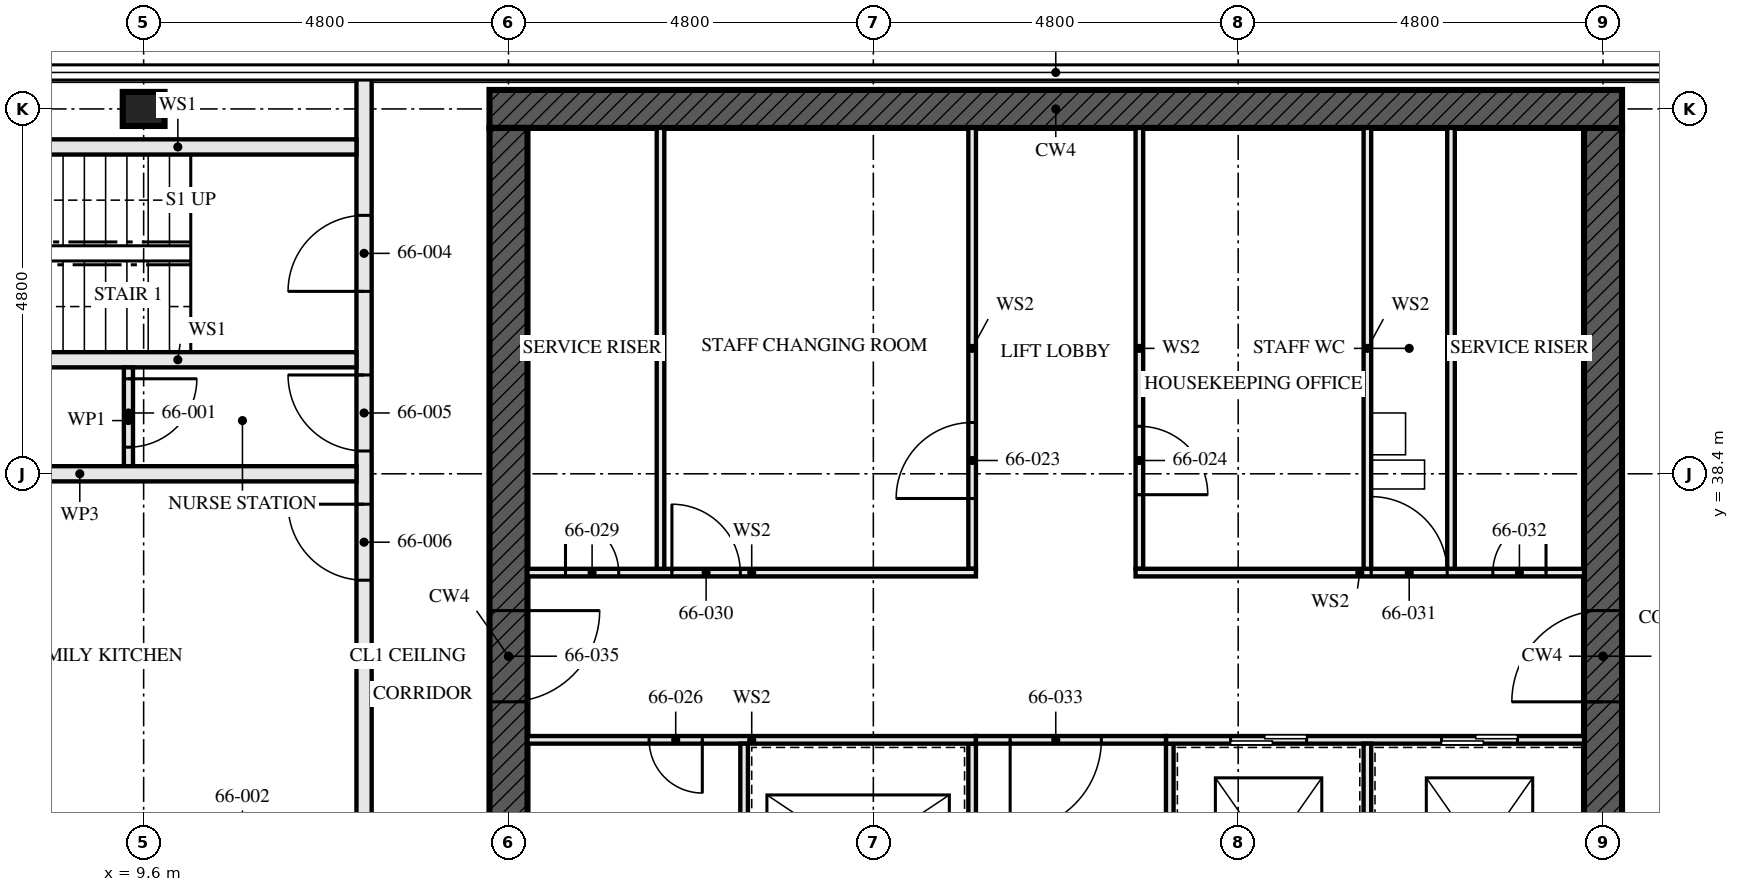
"""IFC4 building model, lengths in metres.
Left out: names, types, materials, properties, quantities, classifications, styles, units other than length and angle.
Written with IfcOpenShell. Run it as: python <this file> out.ifc"""

import sys

from ifc_helpers import new_model, si_unit, direction, frame, frame_2d, origin, origin_2d, place, context, subcontext, project, spatial, rectangle, i_section, extrude, element, fill, save


model = new_model("IFC4")
c1 = context("Model", 3, precision=1e-05, world=origin(), true_north=direction((0.0, 1.0)))
c2 = subcontext(c1, "Body", "Model", "MODEL_VIEW")
j1 = project(units=[si_unit("LENGTHUNIT", "METRE"), si_unit("PLANEANGLEUNIT", "RADIAN")], contexts=[c1])
p1 = place(None, origin())
s1 = spatial("IfcSite", under=j1, at=p1, CompositionType="ELEMENT")
p2 = place(p1, origin())
s2 = spatial("IfcBuilding", under=s1, at=p2, CompositionType="ELEMENT")
p3 = place(p2, frame((0.0, 0.0, 240.0)))
s3 = spatial("IfcBuildingStorey", under=s2, at=p3, CompositionType="ELEMENT", Elevation=240.0)
p4 = place(p3, frame((9.6, 43.2, 0.0), z_axis=(0.0, 0.0, 1.0), x_axis=(0.0, 1.0, 0.0)))
e1 = element("IfcColumn", 1, at=p4, inside=s3, PredefinedType="COLUMN", context=c2, shape_type="SweptSolid", body=[
    extrude(i_section(OverallWidth=0.448, OverallDepth=0.55, WebThickness=0.072, FlangeThickness=0.115, FilletRadius=0.015, at=origin_2d()), origin(), (0.0, 0.0, 1.0), 3.5),
])
p5 = place(p3, frame((29.05, 43.2, -0.17), z_axis=(0.0, 0.0, 1.0), x_axis=(-1.0, 0.0, 0.0)))
e2 = element("IfcWall", 2, at=p5, inside=s3, PredefinedType="SHEAR", context=c2, shape_type="SweptSolid", body=[
    extrude(rectangle(XDim=14.9, YDim=0.5, at=frame_2d((7.45, 0.0))), origin(), (0.0, 0.0, 1.0), 3.42),
])
p6 = place(p3, frame((14.4, 42.95, -0.17), z_axis=(0.0, 0.0, 1.0), x_axis=(0.0, -1.0, 0.0)))
e3 = element("IfcWall", 3, at=p6, inside=s3, PredefinedType="SHEAR", context=c2, shape_type="SweptSolid", body=[
    extrude(rectangle(XDim=13.9, YDim=0.5, at=frame_2d((6.95, 0.0))), origin(), (0.0, 0.0, 1.0), 3.42),
])
p7 = place(p6, frame((6.35, 0.0, 0.17)))
e4 = element("IfcOpeningElement", 4, at=p7, cuts=e3, PredefinedType="OPENING", context=c2, shape_type="SweptSolid", body=[
    extrude(rectangle(XDim=1.2, YDim=2.1, at=frame_2d((0.6, 1.05))), frame((0.0, 0.26, 0.0), z_axis=(0.0, -1.0, 0.0), x_axis=(1.0, 0.0, 0.0)), (0.0, 0.0, 1.0), 0.521),
])
p8 = place(p3, frame((28.8, 29.05, -0.17), z_axis=(0.0, 0.0, 1.0), x_axis=(0.0, 1.0, 0.0)))
e5 = element("IfcWall", 5, at=p8, inside=s3, PredefinedType="SHEAR", context=c2, shape_type="SweptSolid", body=[
    extrude(rectangle(XDim=13.9, YDim=0.5, at=frame_2d((6.95, 0.0))), origin(), (0.0, 0.0, 1.0), 3.42),
])
p9 = place(p8, frame((6.35, 0.0, 0.17)))
e6 = element("IfcOpeningElement", 6, at=p9, cuts=e5, PredefinedType="OPENING", context=c2, shape_type="SweptSolid", body=[
    extrude(rectangle(XDim=1.2, YDim=2.1, at=frame_2d((0.6, 1.05))), frame((0.0, 0.26, 0.0), z_axis=(0.0, -1.0, 0.0), x_axis=(1.0, 0.0, 0.0)), (0.0, 0.0, 1.0), 0.521),
])
for number, where, z_axis, x_axis in (
    (7, (7.7, 42.7, 0.0), (0.0, 0.0, 1.0), (1.0, 0.0, 0.0)),
    (8, (7.7, 39.9, 0.0), (0.0, 0.0, 1.0), (1.0, 0.0, 0.0)),
):
    element("IfcWall", number, at=place(p3, frame(where, z_axis=z_axis, x_axis=x_axis)), inside=s3, PredefinedType="SOLIDWALL", context=c2, shape_type="SweptSolid", body=[
        extrude(rectangle(XDim=4.7, YDim=0.2, at=frame_2d((2.35, 0.0))), origin(), (0.0, 0.0, 1.0), 2.94),
    ])
p10 = place(p3, frame((9.4, 39.8, 0.0), z_axis=(0.0, 0.0, 1.0), x_axis=(0.0, -1.0, 0.0)))
e9 = element("IfcWall", 9, at=p10, inside=s3, PredefinedType="PARTITIONING", context=c2, shape_type="SweptSolid", body=[
    extrude(rectangle(XDim=1.4, YDim=0.12, at=frame_2d((0.7, 0.0))), origin(), (0.0, 0.0, 1.0), 3.25),
])
p11 = place(p10, frame((0.15, 0.0, 0.0)))
e10 = element("IfcOpeningElement", 10, at=p11, cuts=e9, PredefinedType="OPENING", context=c2, shape_type="SweptSolid", body=[
    extrude(rectangle(XDim=0.9, YDim=2.1, at=frame_2d((0.45, 1.05))), frame((0.0, 0.071, 0.0), z_axis=(0.0, -1.0, 0.0), x_axis=(1.0, 0.0, 0.0)), (0.0, 0.0, 1.0), 0.141),
])
p12 = place(p3, frame((5.12, 38.4, 0.0), z_axis=(0.0, 0.0, 1.0), x_axis=(1.0, 0.0, 0.0)))
e11 = element("IfcWall", 11, at=p12, inside=s3, PredefinedType="PARTITIONING", context=c2, shape_type="SweptSolid", body=[
    extrude(rectangle(XDim=7.28, YDim=0.2, at=frame_2d((3.64, 0.0))), origin(), (0.0, 0.0, 1.0), 2.24),
])
p13 = place(p3, frame((12.5, 43.655, 0.0), z_axis=(0.0, 0.0, 1.0), x_axis=(0.0, -1.0, 0.0)))
e12 = element("IfcWall", 12, at=p13, inside=s3, PredefinedType="PARTITIONING", context=c2, shape_type="SweptSolid", body=[
    extrude(rectangle(XDim=15.31, YDim=0.2, at=frame_2d((7.655, 0.0))), origin(), (0.0, 0.0, 1.0), 2.24),
])
p14 = place(p13, frame((1.855, 0.0, 0.0)))
e13 = element("IfcOpeningElement", 13, at=p14, cuts=e12, PredefinedType="OPENING", context=c2, shape_type="SweptSolid", body=[
    extrude(rectangle(XDim=1.0, YDim=2.1, at=frame_2d((0.5, 1.05))), frame((0.0, 0.111, 0.0), z_axis=(0.0, -1.0, 0.0), x_axis=(1.0, 0.0, 0.0)), (0.0, 0.0, 1.0), 0.221),
])
p15 = place(p13, frame((3.955, 0.0, 0.0)))
e14 = element("IfcOpeningElement", 14, at=p15, cuts=e12, PredefinedType="OPENING", context=c2, shape_type="SweptSolid", body=[
    extrude(rectangle(XDim=1.0, YDim=2.1, at=frame_2d((0.5, 1.05))), frame((0.0, 0.111, 0.0), z_axis=(0.0, -1.0, 0.0), x_axis=(1.0, 0.0, 0.0)), (0.0, 0.0, 1.0), 0.221),
])
p16 = place(p13, frame((5.655, 0.0, 0.0)))
e15 = element("IfcOpeningElement", 15, at=p16, cuts=e12, PredefinedType="OPENING", context=c2, shape_type="SweptSolid", body=[
    extrude(rectangle(XDim=1.0, YDim=2.1, at=frame_2d((0.5, 1.05))), frame((0.0, 0.111, 0.0), z_axis=(0.0, -1.0, 0.0), x_axis=(1.0, 0.0, 0.0)), (0.0, 0.0, 1.0), 0.221),
])
for number, where, z_axis, x_axis in (
    (16, (16.4, 37.15, 0.0), (0.0, 0.0, 1.0), (0.0, 1.0, 0.0)),
    (17, (26.8, 37.15, 0.0), (0.0, 0.0, 1.0), (0.0, 1.0, 0.0)),
):
    element("IfcWall", number, at=place(p3, frame(where, z_axis=z_axis, x_axis=x_axis)), inside=s3, PredefinedType="SOLIDWALL", context=c2, shape_type="SweptSolid", body=[
        extrude(rectangle(XDim=5.8, YDim=0.1, at=frame_2d((2.9, 0.0))), origin(), (0.0, 0.0, 1.0), 3.25),
    ])
p17 = place(p3, frame((20.5, 29.05, 0.0), z_axis=(0.0, 0.0, 1.0), x_axis=(0.0, 1.0, 0.0)))
e18 = element("IfcWall", 18, at=p17, inside=s3, PredefinedType="SOLIDWALL", context=c2, shape_type="SweptSolid", body=[
    extrude(rectangle(XDim=5.8, YDim=0.1, at=frame_2d((2.9, 0.0))), origin(), (0.0, 0.0, 1.0), 3.25),
])
p18 = place(p17, frame((0.8, 0.0, 0.0)))
e19 = element("IfcOpeningElement", 19, at=p18, cuts=e18, PredefinedType="OPENING", context=c2, shape_type="SweptSolid", body=[
    extrude(rectangle(XDim=1.1, YDim=2.3, at=frame_2d((0.55, 1.15))), frame((0.0, 0.061, 0.0), z_axis=(0.0, -1.0, 0.0), x_axis=(1.0, 0.0, 0.0)), (0.0, 0.0, 1.0), 0.121),
])
p19 = place(p17, frame((3.775, 0.0, 0.0)))
e20 = element("IfcOpeningElement", 20, at=p19, cuts=e18, PredefinedType="OPENING", context=c2, shape_type="SweptSolid", body=[
    extrude(rectangle(XDim=1.1, YDim=2.3, at=frame_2d((0.55, 1.15))), frame((0.0, 0.061, 0.0), z_axis=(0.0, -1.0, 0.0), x_axis=(1.0, 0.0, 0.0)), (0.0, 0.0, 1.0), 0.121),
])
p20 = place(p3, frame((20.5, 37.15, 0.0), z_axis=(0.0, 0.0, 1.0), x_axis=(0.0, 1.0, 0.0)))
e21 = element("IfcWall", 21, at=p20, inside=s3, PredefinedType="SOLIDWALL", context=c2, shape_type="SweptSolid", body=[
    extrude(rectangle(XDim=5.8, YDim=0.1, at=frame_2d((2.9, 0.0))), origin(), (0.0, 0.0, 1.0), 3.25),
])
p21 = place(p20, frame((0.925, 0.0, 0.0)))
e22 = element("IfcOpeningElement", 22, at=p21, cuts=e21, PredefinedType="OPENING", context=c2, shape_type="SweptSolid", body=[
    extrude(rectangle(XDim=1.0, YDim=2.1, at=frame_2d((0.5, 1.05))), frame((0.0, 0.061, 0.0), z_axis=(0.0, -1.0, 0.0), x_axis=(1.0, 0.0, 0.0)), (0.0, 0.0, 1.0), 0.121),
])
p22 = place(p3, frame((22.7, 37.15, 0.0), z_axis=(0.0, 0.0, 1.0), x_axis=(0.0, 1.0, 0.0)))
e23 = element("IfcWall", 23, at=p22, inside=s3, PredefinedType="SOLIDWALL", context=c2, shape_type="SweptSolid", body=[
    extrude(rectangle(XDim=5.8, YDim=0.1, at=frame_2d((2.9, 0.0))), origin(), (0.0, 0.0, 1.0), 3.25),
])
p23 = place(p22, frame((0.975, 0.0, 0.0)))
e24 = element("IfcOpeningElement", 24, at=p23, cuts=e23, PredefinedType="OPENING", context=c2, shape_type="SweptSolid", body=[
    extrude(rectangle(XDim=0.9, YDim=2.1, at=frame_2d((0.45, 1.05))), frame((0.0, 0.061, 0.0), z_axis=(0.0, -1.0, 0.0), x_axis=(1.0, 0.0, 0.0)), (0.0, 0.0, 1.0), 0.121),
])
p24 = place(p3, frame((23.1, 29.05, 0.0), z_axis=(0.0, 0.0, 1.0), x_axis=(0.0, 1.0, 0.0)))
e25 = element("IfcWall", 25, at=p24, inside=s3, PredefinedType="SOLIDWALL", context=c2, shape_type="SweptSolid", body=[
    extrude(rectangle(XDim=5.8, YDim=0.1, at=frame_2d((2.9, 0.0))), origin(), (0.0, 0.0, 1.0), 3.25),
])
p25 = place(p24, frame((1.0, 0.0, 0.0)))
e26 = element("IfcOpeningElement", 26, at=p25, cuts=e25, PredefinedType="OPENING", context=c2, shape_type="SweptSolid", body=[
    extrude(rectangle(XDim=0.7, YDim=2.1, at=frame_2d((0.35, 1.05))), frame((0.0, 0.061, 0.0), z_axis=(0.0, -1.0, 0.0), x_axis=(1.0, 0.0, 0.0)), (0.0, 0.0, 1.0), 0.121),
])
p26 = place(p3, frame((14.65, 34.9, 0.0), z_axis=(0.0, 0.0, 1.0), x_axis=(1.0, 0.0, 0.0)))
e27 = element("IfcWall", 27, at=p26, inside=s3, PredefinedType="SOLIDWALL", context=c2, shape_type="SweptSolid", body=[
    extrude(rectangle(XDim=5.9, YDim=0.1, at=frame_2d((2.95, 0.0))), origin(), (0.0, 0.0, 1.0), 3.25),
])
p27 = place(p26, frame((1.6, 0.0, 0.0)))
e28 = element("IfcOpeningElement", 28, at=p27, cuts=e27, PredefinedType="OPENING", context=c2, shape_type="SweptSolid", body=[
    extrude(rectangle(XDim=0.7, YDim=2.1, at=frame_2d((0.35, 1.05))), frame((0.0, 0.061, 0.0), z_axis=(0.0, -1.0, 0.0), x_axis=(1.0, 0.0, 0.0)), (0.0, 0.0, 1.0), 0.121),
])
p28 = place(p3, frame((23.05, 34.9, 0.0), z_axis=(0.0, 0.0, 1.0), x_axis=(1.0, 0.0, 0.0)))
e29 = element("IfcWall", 29, at=p28, inside=s3, PredefinedType="SOLIDWALL", context=c2, shape_type="SweptSolid", body=[
    extrude(rectangle(XDim=5.5, YDim=0.1, at=frame_2d((2.75, 0.0))), origin(), (0.0, 0.0, 1.0), 3.25),
])
p29 = place(p28, frame((0.85, 0.0, 0.0)))
e30 = element("IfcOpeningElement", 30, at=p29, cuts=e29, PredefinedType="OPENING", context=c2, shape_type="SweptSolid", body=[
    extrude(rectangle(XDim=1.0, YDim=2.1, at=frame_2d((0.5, 1.05))), frame((0.0, 0.061, 0.0), z_axis=(0.0, -1.0, 0.0), x_axis=(1.0, 0.0, 0.0)), (0.0, 0.0, 1.0), 0.121),
])
p30 = place(p28, frame((3.625, 0.0, 0.0)))
e31 = element("IfcOpeningElement", 31, at=p30, cuts=e29, PredefinedType="OPENING", context=c2, shape_type="SweptSolid", body=[
    extrude(rectangle(XDim=1.0, YDim=2.1, at=frame_2d((0.5, 1.05))), frame((0.0, 0.061, 0.0), z_axis=(0.0, -1.0, 0.0), x_axis=(1.0, 0.0, 0.0)), (0.0, 0.0, 1.0), 0.121),
])
p31 = place(p3, frame((14.65, 37.1, 0.0), z_axis=(0.0, 0.0, 1.0), x_axis=(1.0, 0.0, 0.0)))
e32 = element("IfcWall", 32, at=p31, inside=s3, PredefinedType="SOLIDWALL", context=c2, shape_type="SweptSolid", body=[
    extrude(rectangle(XDim=5.9, YDim=0.1, at=frame_2d((2.95, 0.0))), origin(), (0.0, 0.0, 1.0), 3.25),
])
p32 = place(p31, frame((0.5, 0.0, 0.0)))
e33 = element("IfcOpeningElement", 33, at=p32, cuts=e32, PredefinedType="OPENING", context=c2, shape_type="SweptSolid", body=[
    extrude(rectangle(XDim=0.7, YDim=2.1, at=frame_2d((0.35, 1.05))), frame((0.0, 0.061, 0.0), z_axis=(0.0, -1.0, 0.0), x_axis=(1.0, 0.0, 0.0)), (0.0, 0.0, 1.0), 0.121),
])
p33 = place(p31, frame((1.9, 0.0, 0.0)))
e34 = element("IfcOpeningElement", 34, at=p33, cuts=e32, PredefinedType="OPENING", context=c2, shape_type="SweptSolid", body=[
    extrude(rectangle(XDim=0.9, YDim=2.1, at=frame_2d((0.45, 1.05))), frame((0.0, 0.061, 0.0), z_axis=(0.0, -1.0, 0.0), x_axis=(1.0, 0.0, 0.0)), (0.0, 0.0, 1.0), 0.121),
])
p34 = place(p3, frame((22.65, 37.1, 0.0), z_axis=(0.0, 0.0, 1.0), x_axis=(1.0, 0.0, 0.0)))
e35 = element("IfcWall", 35, at=p34, inside=s3, PredefinedType="SOLIDWALL", context=c2, shape_type="SweptSolid", body=[
    extrude(rectangle(XDim=5.9, YDim=0.1, at=frame_2d((2.95, 0.0))), origin(), (0.0, 0.0, 1.0), 3.25),
])
p35 = place(p34, frame((3.1, 0.0, 0.0)))
e36 = element("IfcOpeningElement", 36, at=p35, cuts=e35, PredefinedType="OPENING", context=c2, shape_type="SweptSolid", body=[
    extrude(rectangle(XDim=1.0, YDim=2.1, at=frame_2d((0.5, 1.05))), frame((0.0, 0.061, 0.0), z_axis=(0.0, -1.0, 0.0), x_axis=(1.0, 0.0, 0.0)), (0.0, 0.0, 1.0), 0.121),
])
p36 = place(p34, frame((4.7, 0.0, 0.0)))
e37 = element("IfcOpeningElement", 37, at=p36, cuts=e35, PredefinedType="OPENING", context=c2, shape_type="SweptSolid", body=[
    extrude(rectangle(XDim=0.7, YDim=2.1, at=frame_2d((0.35, 1.05))), frame((0.0, 0.061, 0.0), z_axis=(0.0, -1.0, 0.0), x_axis=(1.0, 0.0, 0.0)), (0.0, 0.0, 1.0), 0.121),
])
p37 = place(p3, frame((20.55, 34.9, 0.0), z_axis=(0.0, 0.0, 1.0), x_axis=(1.0, 0.0, 0.0)))
e38 = element("IfcWall", 38, at=p37, inside=s3, PredefinedType="SOLIDWALL", context=c2, shape_type="SweptSolid", body=[
    extrude(rectangle(XDim=2.5, YDim=0.1, at=frame_2d((1.25, 0.0))), origin(), (0.0, 0.0, 1.0), 3.25),
])
p38 = place(p37, frame((0.45, 0.0, 0.0)))
e39 = element("IfcOpeningElement", 39, at=p38, cuts=e38, PredefinedType="OPENING", context=c2, shape_type="SweptSolid", body=[
    extrude(rectangle(XDim=1.2, YDim=2.1, at=frame_2d((0.6, 1.05))), frame((0.0, 0.061, 0.0), z_axis=(0.0, -1.0, 0.0), x_axis=(1.0, 0.0, 0.0)), (0.0, 0.0, 1.0), 0.121),
])
for number, where, z_axis, x_axis in (
    (40, (17.5, 29.05, 0.0), (0.0, 0.0, 1.0), (0.0, 1.0, 0.0)),
    (41, (25.7, 37.15, 0.0), (0.0, 0.0, 1.0), (0.0, 1.0, 0.0)),
):
    element("IfcWall", number, at=place(p3, frame(where, z_axis=z_axis, x_axis=x_axis)), inside=s3, PredefinedType="SOLIDWALL", context=c2, shape_type="SweptSolid", body=[
        extrude(rectangle(XDim=5.8, YDim=0.1, at=frame_2d((2.9, 0.0))), origin(), (0.0, 0.0, 1.0), 3.25),
    ])
p39 = place(p3, frame((25.7, 31.95, 0.0), z_axis=(0.0, 0.0, 1.0), x_axis=(0.0, 1.0, 0.0)))
e42 = element("IfcWall", 42, at=p39, inside=s3, PredefinedType="SOLIDWALL", context=c2, shape_type="SweptSolid", body=[
    extrude(rectangle(XDim=2.9, YDim=0.1, at=frame_2d((1.45, 0.0))), origin(), (0.0, 0.0, 1.0), 3.25),
])
p40 = place(p11, origin())
e43 = element("IfcDoor", 43, at=p40, inside=s3, OperationType="SINGLE_SWING_RIGHT", PredefinedType="DOOR", context=c2, shape_type="SweptSolid", body=[
    extrude(rectangle(XDim=0.9, YDim=2.1, at=frame_2d((0.45, 1.05))), frame((0.0, 0.022, 0.0), z_axis=(0.0, -1.0, 0.0), x_axis=(1.0, 0.0, 0.0)), (0.0, 0.0, 1.0), 0.044),
])
fill(e10, e43)
p41 = place(p14, frame((1.0, 0.0, 0.0), z_axis=(0.0, 0.0, 1.0), x_axis=(-1.0, 0.0, 0.0)))
e44 = element("IfcDoor", 44, at=p41, inside=s3, OperationType="SINGLE_SWING_RIGHT", PredefinedType="DOOR", context=c2, shape_type="SweptSolid", body=[
    extrude(rectangle(XDim=1.0, YDim=2.1, at=frame_2d((0.5, 1.05))), frame((0.0, 0.032, 0.0), z_axis=(0.0, -1.0, 0.0), x_axis=(1.0, 0.0, 0.0)), (0.0, 0.0, 1.0), 0.064),
])
fill(e13, e44)
p42 = place(p15, frame((1.0, 0.0, 0.0), z_axis=(0.0, 0.0, 1.0), x_axis=(-1.0, 0.0, 0.0)))
e45 = element("IfcDoor", 45, at=p42, inside=s3, OperationType="SINGLE_SWING_LEFT", PredefinedType="DOOR", context=c2, shape_type="SweptSolid", body=[
    extrude(rectangle(XDim=1.0, YDim=2.1, at=frame_2d((0.5, 1.05))), frame((0.0, 0.027, 0.0), z_axis=(0.0, -1.0, 0.0), x_axis=(1.0, 0.0, 0.0)), (0.0, 0.0, 1.0), 0.054),
])
fill(e14, e45)
p43 = place(p16, frame((1.0, 0.0, 0.0), z_axis=(0.0, 0.0, 1.0), x_axis=(-1.0, 0.0, 0.0)))
e46 = element("IfcDoor", 46, at=p43, inside=s3, OperationType="SINGLE_SWING_LEFT", PredefinedType="DOOR", context=c2, shape_type="SweptSolid", body=[
    extrude(rectangle(XDim=1.0, YDim=2.1, at=frame_2d((0.5, 1.05))), frame((0.0, 0.027, 0.0), z_axis=(0.0, -1.0, 0.0), x_axis=(1.0, 0.0, 0.0)), (0.0, 0.0, 1.0), 0.054),
])
fill(e15, e46)
p44 = place(p21, origin())
e47 = element("IfcDoor", 47, at=p44, inside=s3, OperationType="SINGLE_SWING_RIGHT", PredefinedType="DOOR", context=c2, shape_type="SweptSolid", body=[
    extrude(rectangle(XDim=1.0, YDim=2.1, at=frame_2d((0.5, 1.05))), frame((0.0, 0.027, 0.0), z_axis=(0.0, -1.0, 0.0), x_axis=(1.0, 0.0, 0.0)), (0.0, 0.0, 1.0), 0.054),
])
fill(e22, e47)
p45 = place(p23, frame((0.9, 0.0, 0.0), z_axis=(0.0, 0.0, 1.0), x_axis=(-1.0, 0.0, 0.0)))
e48 = element("IfcDoor", 48, at=p45, inside=s3, OperationType="SINGLE_SWING_LEFT", PredefinedType="DOOR", context=c2, shape_type="SweptSolid", body=[
    extrude(rectangle(XDim=0.9, YDim=2.1, at=frame_2d((0.45, 1.05))), frame((0.0, 0.027, 0.0), z_axis=(0.0, -1.0, 0.0), x_axis=(1.0, 0.0, 0.0)), (0.0, 0.0, 1.0), 0.054),
])
fill(e24, e48)
p46 = place(p27, frame((0.7, 0.0, 0.0), z_axis=(0.0, 0.0, 1.0), x_axis=(-1.0, 0.0, 0.0)))
e49 = element("IfcDoor", 49, at=p46, inside=s3, OperationType="SINGLE_SWING_RIGHT", PredefinedType="DOOR", context=c2, shape_type="SweptSolid", body=[
    extrude(rectangle(XDim=0.7, YDim=2.1, at=frame_2d((0.35, 1.05))), frame((0.0, 0.027, 0.0), z_axis=(0.0, -1.0, 0.0), x_axis=(1.0, 0.0, 0.0)), (0.0, 0.0, 1.0), 0.054),
])
fill(e28, e49)
p47 = place(p29, origin())
e50 = element("IfcDoor", 50, at=p47, inside=s3, OperationType="SLIDING_TO_LEFT", PredefinedType="DOOR", context=c2, shape_type="SweptSolid", body=[
    extrude(rectangle(XDim=1.0, YDim=2.1, at=frame_2d((0.5, 1.05))), frame((0.0, 0.05, 0.0), z_axis=(0.0, -1.0, 0.0), x_axis=(1.0, 0.0, 0.0)), (0.0, 0.0, 1.0), 0.1),
])
fill(e30, e50)
p48 = place(p30, origin())
e51 = element("IfcDoor", 51, at=p48, inside=s3, OperationType="SLIDING_TO_LEFT", PredefinedType="DOOR", context=c2, shape_type="SweptSolid", body=[
    extrude(rectangle(XDim=1.0, YDim=2.1, at=frame_2d((0.5, 1.05))), frame((0.0, 0.05, 0.0), z_axis=(0.0, -1.0, 0.0), x_axis=(1.0, 0.0, 0.0)), (0.0, 0.0, 1.0), 0.1),
])
fill(e31, e51)
p49 = place(p32, origin())
e52 = element("IfcDoor", 52, at=p49, inside=s3, OperationType="SINGLE_SWING_RIGHT", PredefinedType="DOOR", context=c2, shape_type="SweptSolid", body=[
    extrude(rectangle(XDim=0.7, YDim=2.1, at=frame_2d((0.35, 1.05))), frame((0.0, 0.027, 0.0), z_axis=(0.0, -1.0, 0.0), x_axis=(1.0, 0.0, 0.0)), (0.0, 0.0, 1.0), 0.054),
])
fill(e33, e52)
p50 = place(p33, origin())
e53 = element("IfcDoor", 53, at=p50, inside=s3, OperationType="SINGLE_SWING_RIGHT", PredefinedType="DOOR", context=c2, shape_type="SweptSolid", body=[
    extrude(rectangle(XDim=0.9, YDim=2.1, at=frame_2d((0.45, 1.05))), frame((0.0, 0.027, 0.0), z_axis=(0.0, -1.0, 0.0), x_axis=(1.0, 0.0, 0.0)), (0.0, 0.0, 1.0), 0.054),
])
fill(e34, e53)
p51 = place(p35, origin())
e54 = element("IfcDoor", 54, at=p51, inside=s3, OperationType="SINGLE_SWING_RIGHT", PredefinedType="DOOR", context=c2, shape_type="SweptSolid", body=[
    extrude(rectangle(XDim=1.0, YDim=2.1, at=frame_2d((0.5, 1.05))), frame((0.0, 0.027, 0.0), z_axis=(0.0, -1.0, 0.0), x_axis=(1.0, 0.0, 0.0)), (0.0, 0.0, 1.0), 0.054),
])
fill(e36, e54)
p52 = place(p36, origin())
e55 = element("IfcDoor", 55, at=p52, inside=s3, OperationType="SINGLE_SWING_LEFT", PredefinedType="DOOR", context=c2, shape_type="SweptSolid", body=[
    extrude(rectangle(XDim=0.7, YDim=2.1, at=frame_2d((0.35, 1.05))), frame((0.0, 0.027, 0.0), z_axis=(0.0, -1.0, 0.0), x_axis=(1.0, 0.0, 0.0)), (0.0, 0.0, 1.0), 0.054),
])
fill(e37, e55)
p53 = place(p38, frame((1.2, 0.0, 0.0), z_axis=(0.0, 0.0, 1.0), x_axis=(-1.0, 0.0, 0.0)))
e56 = element("IfcDoor", 56, at=p53, inside=s3, OperationType="SINGLE_SWING_LEFT", PredefinedType="DOOR", context=c2, shape_type="SweptSolid", body=[
    extrude(rectangle(XDim=1.2, YDim=2.1, at=frame_2d((0.6, 1.05))), frame((0.0, 0.027, 0.0), z_axis=(0.0, -1.0, 0.0), x_axis=(1.0, 0.0, 0.0)), (0.0, 0.0, 1.0), 0.054),
])
fill(e39, e56)
p54 = place(p7, origin())
e57 = element("IfcDoor", 57, at=p54, inside=s3, OperationType="SINGLE_SWING_LEFT", PredefinedType="DOOR", context=c2, shape_type="SweptSolid", body=[
    extrude(rectangle(XDim=1.2, YDim=2.1, at=frame_2d((0.6, 1.05))), frame((0.0, 0.027, 0.0), z_axis=(0.0, -1.0, 0.0), x_axis=(1.0, 0.0, 0.0)), (0.0, 0.0, 1.0), 0.054),
])
fill(e4, e57)
p55 = place(p9, origin())
e58 = element("IfcDoor", 58, at=p55, inside=s3, OperationType="SINGLE_SWING_LEFT", PredefinedType="DOOR", context=c2, shape_type="SweptSolid", body=[
    extrude(rectangle(XDim=1.2, YDim=2.1, at=frame_2d((0.6, 1.05))), frame((0.0, 0.027, 0.0), z_axis=(0.0, -1.0, 0.0), x_axis=(1.0, 0.0, 0.0)), (0.0, 0.0, 1.0), 0.054),
])
fill(e6, e58)
save(model, sys.argv[1])
